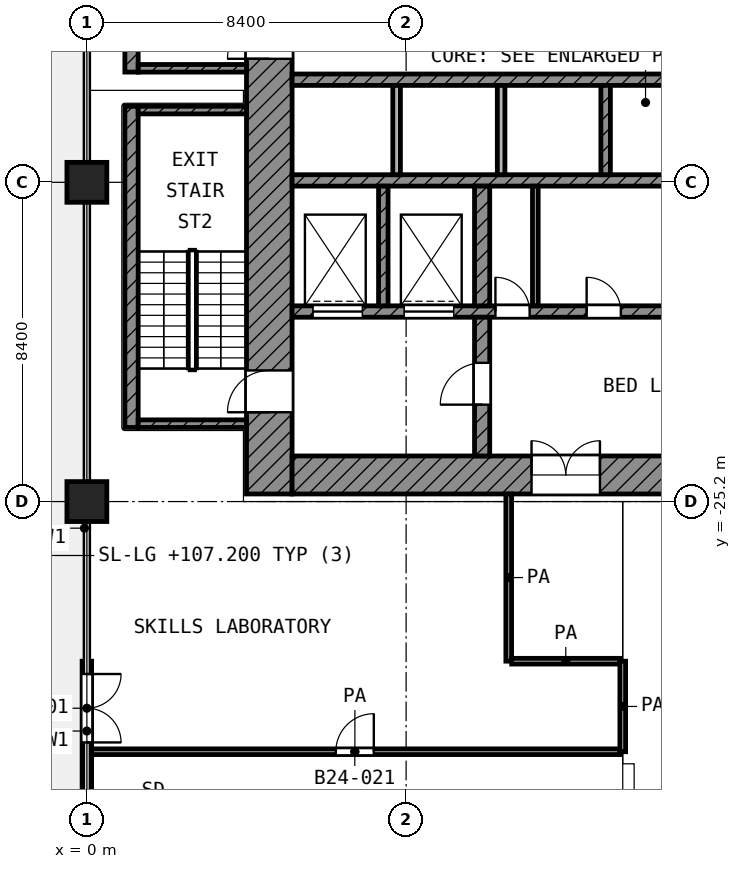
"""IFC4 building model, lengths in metres.
Left out: names, types, materials, properties, quantities, classifications, styles, units other than length and angle.
Written with IfcOpenShell. Run it as: python <this file> out.ifc"""

import sys

from ifc_helpers import new_model, si_unit, direction, frame, frame_2d, origin, origin_2d, place, context, subcontext, project, spatial, rectangle, extrude, element, fill, save


model = new_model("IFC4")
c1 = context("Model", 3, precision=1e-05, world=origin(), true_north=direction((0.0, 1.0)))
c2 = subcontext(c1, "Body", "Model", "MODEL_VIEW")
j1 = project(units=[si_unit("LENGTHUNIT", "METRE"), si_unit("PLANEANGLEUNIT", "RADIAN")], contexts=[c1])
p1 = place(None, origin())
s1 = spatial("IfcSite", under=j1, at=p1, CompositionType="ELEMENT")
p2 = place(p1, origin())
s2 = spatial("IfcBuilding", under=s1, at=p2, CompositionType="ELEMENT")
p3 = place(p2, frame((0.0, 0.0, 107.2)))
s3 = spatial("IfcBuildingStorey", under=s2, at=p3, CompositionType="ELEMENT", Elevation=107.2)
for number, where, z_axis, x_axis in (
    (1, (0.0, -16.8, 0.0), (0.0, 0.0, 1.0), (1.0, 0.0, 0.0)),
    (2, (0.0, -25.2, 0.0), (0.0, 0.0, 1.0), (1.0, 0.0, 0.0)),
):
    element("IfcColumn", number, at=place(p3, frame(where, z_axis=z_axis, x_axis=x_axis)), inside=s3, PredefinedType="COLUMN", context=c2, shape_type="SweptSolid", body=[
        extrude(rectangle(XDim=1.05, YDim=1.05, at=origin_2d()), origin(), (0.0, 0.0, 1.0), 4.2),
    ])
p4 = place(p3, frame((0.0, -29.4, 0.0), z_axis=(0.0, 0.0, 1.0), x_axis=(0.0, -1.0, 0.0)))
e3 = element("IfcWall", 3, at=p4, inside=s3, PredefinedType="SOLIDWALL", context=c2, shape_type="SweptSolid", body=[
    extrude(rectangle(XDim=3.675, YDim=0.25, at=frame_2d((1.837, 0.0))), origin(), (0.0, 0.0, 1.0), 3.48),
])
p5 = place(p4, frame((0.337, 0.0, 0.0)))
e4 = element("IfcOpeningElement", 4, at=p5, cuts=e3, PredefinedType="OPENING", context=c2, shape_type="SweptSolid", body=[
    extrude(rectangle(XDim=1.8, YDim=2.1, at=frame_2d((0.9, 1.05))), frame((0.0, 0.135, 0.0), z_axis=(0.0, -1.0, 0.0), x_axis=(1.0, 0.0, 0.0)), (0.0, 0.0, 1.0), 0.27),
])
p6 = place(p3, frame((4.8, -25.0, 0.0), z_axis=(0.0, 0.0, 1.0), x_axis=(0.0, 1.0, 0.0)))
e5 = element("IfcWall", 5, at=p6, inside=s3, PredefinedType="SHEAR", context=c2, shape_type="SweptSolid", body=[
    extrude(rectangle(XDim=19.6, YDim=1.2, at=frame_2d((9.8, 0.0))), origin(), (0.0, 0.0, 1.0), 3.6),
])
p7 = place(p6, frame((11.45, 0.0, 0.0)))
e6 = element("IfcOpeningElement", 6, at=p7, cuts=e5, PredefinedType="OPENING", context=c2, shape_type="SweptSolid", body=[
    extrude(rectangle(XDim=1.1, YDim=2.1, at=frame_2d((0.55, 1.05))), frame((0.0, 0.61, 0.0), z_axis=(0.0, -1.0, 0.0), x_axis=(1.0, 0.0, 0.0)), (0.0, 0.0, 1.0), 1.22),
])
p8 = place(p6, frame((2.15, 0.0, 0.0)))
e7 = element("IfcOpeningElement", 7, at=p8, cuts=e5, PredefinedType="OPENING", context=c2, shape_type="SweptSolid", body=[
    extrude(rectangle(XDim=1.1, YDim=2.1, at=frame_2d((0.55, 1.05))), frame((0.0, 0.61, 0.0), z_axis=(0.0, -1.0, 0.0), x_axis=(1.0, 0.0, 0.0)), (0.0, 0.0, 1.0), 1.22),
])
p9 = place(p3, frame((5.4, -24.5, 0.0), z_axis=(0.0, 0.0, 1.0), x_axis=(1.0, 0.0, 0.0)))
e8 = element("IfcWall", 8, at=p9, inside=s3, PredefinedType="SHEAR", context=c2, shape_type="SweptSolid", body=[
    extrude(rectangle(XDim=18.6, YDim=1.0, at=frame_2d((9.3, 0.0))), origin(), (0.0, 0.0, 1.0), 3.6),
])
p10 = place(p9, frame((6.3, 0.0, 0.0)))
e9 = element("IfcOpeningElement", 9, at=p10, cuts=e8, PredefinedType="OPENING", context=c2, shape_type="SweptSolid", body=[
    extrude(rectangle(XDim=1.8, YDim=2.1, at=frame_2d((0.9, 1.05))), frame((0.0, 0.51, 0.0), z_axis=(0.0, -1.0, 0.0), x_axis=(1.0, 0.0, 0.0)), (0.0, 0.0, 1.0), 1.02),
])
for number, where, z_axis, x_axis in (
    (10, (5.4, -14.1, 0.0), (0.0, 0.0, 1.0), (1.0, 0.0, 0.0)),
    (11, (5.4, -16.75, 0.0), (0.0, 0.0, 1.0), (1.0, 0.0, 0.0)),
):
    element("IfcWall", number, at=place(p3, frame(where, z_axis=z_axis, x_axis=x_axis)), inside=s3, PredefinedType="SHEAR", context=c2, shape_type="SweptSolid", body=[
        extrude(rectangle(XDim=16.65, YDim=0.3, at=frame_2d((8.325, 0.0))), origin(), (0.0, 0.0, 1.0), 3.6),
    ])
p11 = place(p3, frame((5.4, -20.2, 0.0), z_axis=(0.0, 0.0, 1.0), x_axis=(1.0, 0.0, 0.0)))
e12 = element("IfcWall", 12, at=p11, inside=s3, PredefinedType="SHEAR", context=c2, shape_type="SweptSolid", body=[
    extrude(rectangle(XDim=14.65, YDim=0.3, at=frame_2d((7.325, 0.0))), origin(), (0.0, 0.0, 1.0), 3.6),
])
p12 = place(p11, frame((10.55, 0.0, 0.0)))
e13 = element("IfcOpeningElement", 13, at=p12, cuts=e12, PredefinedType="OPENING", context=c2, shape_type="SweptSolid", body=[
    extrude(rectangle(XDim=1.3, YDim=2.1, at=frame_2d((0.65, 1.05))), frame((0.0, 0.16, 0.0), z_axis=(0.0, -1.0, 0.0), x_axis=(1.0, 0.0, 0.0)), (0.0, 0.0, 1.0), 0.32),
])
p13 = place(p11, frame((12.95, 0.0, 0.0)))
e14 = element("IfcOpeningElement", 14, at=p13, cuts=e12, PredefinedType="OPENING", context=c2, shape_type="SweptSolid", body=[
    extrude(rectangle(XDim=1.3, YDim=2.1, at=frame_2d((0.65, 1.05))), frame((0.0, 0.16, 0.0), z_axis=(0.0, -1.0, 0.0), x_axis=(1.0, 0.0, 0.0)), (0.0, 0.0, 1.0), 0.32),
])
p14 = place(p11, frame((0.55, 0.0, 0.0)))
e15 = element("IfcOpeningElement", 15, at=p14, cuts=e12, PredefinedType="OPENING", context=c2, shape_type="SweptSolid", body=[
    extrude(rectangle(XDim=1.3, YDim=2.1, at=frame_2d((0.65, 1.05))), frame((0.0, 0.16, 0.0), z_axis=(0.0, -1.0, 0.0), x_axis=(1.0, 0.0, 0.0)), (0.0, 0.0, 1.0), 0.32),
])
p15 = place(p11, frame((2.95, 0.0, 0.0)))
e16 = element("IfcOpeningElement", 16, at=p15, cuts=e12, PredefinedType="OPENING", context=c2, shape_type="SweptSolid", body=[
    extrude(rectangle(XDim=1.3, YDim=2.1, at=frame_2d((0.65, 1.05))), frame((0.0, 0.16, 0.0), z_axis=(0.0, -1.0, 0.0), x_axis=(1.0, 0.0, 0.0)), (0.0, 0.0, 1.0), 0.32),
])
p16 = place(p11, frame((5.35, 0.0, 0.0)))
e17 = element("IfcOpeningElement", 17, at=p16, cuts=e12, PredefinedType="OPENING", context=c2, shape_type="SweptSolid", body=[
    extrude(rectangle(XDim=0.9, YDim=2.1, at=frame_2d((0.45, 1.05))), frame((0.0, 0.16, 0.0), z_axis=(0.0, -1.0, 0.0), x_axis=(1.0, 0.0, 0.0)), (0.0, 0.0, 1.0), 0.32),
])
p17 = place(p11, frame((7.75, 0.0, 0.0)))
e18 = element("IfcOpeningElement", 18, at=p17, cuts=e12, PredefinedType="OPENING", context=c2, shape_type="SweptSolid", body=[
    extrude(rectangle(XDim=0.9, YDim=2.1, at=frame_2d((0.45, 1.05))), frame((0.0, 0.16, 0.0), z_axis=(0.0, -1.0, 0.0), x_axis=(1.0, 0.0, 0.0)), (0.0, 0.0, 1.0), 0.32),
])
p18 = place(p3, frame((10.4, -24.0, 0.0), z_axis=(0.0, 0.0, 1.0), x_axis=(0.0, 1.0, 0.0)))
e19 = element("IfcWall", 19, at=p18, inside=s3, PredefinedType="SHEAR", context=c2, shape_type="SweptSolid", body=[
    extrude(rectangle(XDim=3.65, YDim=0.4, at=frame_2d((1.825, 0.0))), origin(), (0.0, 0.0, 1.0), 3.6),
])
p19 = place(p18, frame((1.35, 0.0, 0.0)))
e20 = element("IfcOpeningElement", 20, at=p19, cuts=e19, PredefinedType="OPENING", context=c2, shape_type="SweptSolid", body=[
    extrude(rectangle(XDim=1.1, YDim=2.1, at=frame_2d((0.55, 1.05))), frame((0.0, 0.21, 0.0), z_axis=(0.0, -1.0, 0.0), x_axis=(1.0, 0.0, 0.0)), (0.0, 0.0, 1.0), 0.42),
])
p20 = place(p3, frame((10.4, -20.05, 0.0), z_axis=(0.0, 0.0, 1.0), x_axis=(0.0, 1.0, 0.0)))
e21 = element("IfcWall", 21, at=p20, inside=s3, PredefinedType="SHEAR", context=c2, shape_type="SweptSolid", body=[
    extrude(rectangle(XDim=3.15, YDim=0.4, at=frame_2d((1.575, 0.0))), origin(), (0.0, 0.0, 1.0), 3.6),
])
p21 = place(p3, frame((7.8, -20.05, 0.0), z_axis=(0.0, 0.0, 1.0), x_axis=(0.0, 1.0, 0.0)))
e22 = element("IfcWall", 22, at=p21, inside=s3, PredefinedType="SHEAR", context=c2, shape_type="SweptSolid", body=[
    extrude(rectangle(XDim=3.15, YDim=0.25, at=frame_2d((1.575, 0.0))), origin(), (0.0, 0.0, 1.0), 3.6),
])
for number, where, z_axis, x_axis in (
    (23, (8.15, -16.6, 0.0), (0.0, 0.0, 1.0), (0.0, 1.0, 0.0)),
    (24, (10.9, -16.6, 0.0), (0.0, 0.0, 1.0), (0.0, 1.0, 0.0)),
):
    element("IfcWall", number, at=place(p3, frame(where, z_axis=z_axis, x_axis=x_axis)), inside=s3, PredefinedType="PARTITIONING", context=c2, shape_type="SweptSolid", body=[
        extrude(rectangle(XDim=2.35, YDim=0.2, at=frame_2d((1.175, 0.0))), origin(), (0.0, 0.0, 1.0), 3.6),
    ])
p22 = place(p3, frame((13.65, -16.6, 0.0), z_axis=(0.0, 0.0, 1.0), x_axis=(0.0, 1.0, 0.0)))
e25 = element("IfcWall", 25, at=p22, inside=s3, PredefinedType="SHEAR", context=c2, shape_type="SweptSolid", body=[
    extrude(rectangle(XDim=2.35, YDim=0.25, at=frame_2d((1.175, 0.0))), origin(), (0.0, 0.0, 1.0), 3.6),
])
p23 = place(p3, frame((11.8, -20.05, 0.0), z_axis=(0.0, 0.0, 1.0), x_axis=(0.0, 1.0, 0.0)))
e26 = element("IfcWall", 26, at=p23, inside=s3, PredefinedType="PARTITIONING", context=c2, shape_type="SweptSolid", body=[
    extrude(rectangle(XDim=3.15, YDim=0.15, at=frame_2d((1.575, 0.0))), origin(), (0.0, 0.0, 1.0), 3.6),
])
p24 = place(p3, frame((1.175, -13.9, 0.0), z_axis=(0.0, 0.0, 1.0), x_axis=(0.0, 1.0, 0.0)))
e27 = element("IfcWall", 27, at=p24, inside=s3, PredefinedType="SHEAR", context=c2, shape_type="SweptSolid", body=[
    extrude(rectangle(XDim=8.45, YDim=0.35, at=frame_2d((4.225, 0.0))), origin(), (0.0, 0.0, 1.0), 3.6),
])
p25 = place(p3, frame((1.35, -13.8, 0.0), z_axis=(0.0, 0.0, 1.0), x_axis=(1.0, 0.0, 0.0)))
e28 = element("IfcWall", 28, at=p25, inside=s3, PredefinedType="SHEAR", context=c2, shape_type="SweptSolid", body=[
    extrude(rectangle(XDim=2.85, YDim=0.2, at=frame_2d((1.425, 0.0))), origin(), (0.0, 0.0, 1.0), 3.6),
])
p26 = place(p3, frame((1.175, -23.25, 0.0), z_axis=(0.0, 0.0, 1.0), x_axis=(0.0, 1.0, 0.0)))
e29 = element("IfcWall", 29, at=p26, inside=s3, PredefinedType="SHEAR", context=c2, shape_type="SweptSolid", body=[
    extrude(rectangle(XDim=8.45, YDim=0.35, at=frame_2d((4.225, 0.0))), origin(), (0.0, 0.0, 1.0), 3.6),
])
for number, where, z_axis, x_axis in (
    (30, (1.35, -14.9, 0.0), (0.0, 0.0, 1.0), (1.0, 0.0, 0.0)),
    (31, (1.35, -23.15, 0.0), (0.0, 0.0, 1.0), (1.0, 0.0, 0.0)),
):
    element("IfcWall", number, at=place(p3, frame(where, z_axis=z_axis, x_axis=x_axis)), inside=s3, PredefinedType="SHEAR", context=c2, shape_type="SweptSolid", body=[
        extrude(rectangle(XDim=2.85, YDim=0.2, at=frame_2d((1.425, 0.0))), origin(), (0.0, 0.0, 1.0), 3.6),
    ])
p27 = place(p3, frame((0.08, -31.782, 0.0), z_axis=(0.0, 0.0, 1.0), x_axis=(1.0, 0.0, 0.0)))
e32 = element("IfcWall", 32, at=p27, inside=s3, PredefinedType="PARTITIONING", context=c2, shape_type="SweptSolid", body=[
    extrude(rectangle(XDim=13.945, YDim=0.15, at=frame_2d((6.972, 0.0))), origin(), (0.0, 0.0, 1.0), 3.6),
])
p28 = place(p27, frame((6.47, 0.0, 0.0)))
e33 = element("IfcOpeningElement", 33, at=p28, cuts=e32, PredefinedType="OPENING", context=c2, shape_type="SweptSolid", body=[
    extrude(rectangle(XDim=1.0, YDim=2.1, at=frame_2d((0.5, 1.05))), frame((0.0, 0.085, 0.0), z_axis=(0.0, -1.0, 0.0), x_axis=(1.0, 0.0, 0.0)), (0.0, 0.0, 1.0), 0.17),
])
p29 = place(p3, frame((11.177, -29.4, 0.0), z_axis=(0.0, 0.0, 1.0), x_axis=(1.0, 0.0, 0.0)))
e34 = element("IfcWall", 34, at=p29, inside=s3, PredefinedType="PARTITIONING", context=c2, shape_type="SweptSolid", body=[
    extrude(rectangle(XDim=2.848, YDim=0.15, at=frame_2d((1.424, 0.0))), origin(), (0.0, 0.0, 1.0), 3.6),
])
p30 = place(p3, frame((11.1, -29.399, 0.0), z_axis=(0.0, 0.0, 1.0), x_axis=(0.0, 1.0, 0.0)))
e35 = element("IfcWall", 35, at=p30, inside=s3, PredefinedType="PARTITIONING", context=c2, shape_type="SweptSolid", body=[
    extrude(rectangle(XDim=4.399, YDim=0.15, at=frame_2d((2.199, 0.0))), origin(), (0.0, 0.0, 1.0), 3.6),
])
p31 = place(p3, frame((14.1, -31.782, 0.0), z_axis=(0.0, 0.0, 1.0), x_axis=(0.0, 1.0, 0.0)))
e36 = element("IfcWall", 36, at=p31, inside=s3, PredefinedType="PARTITIONING", context=c2, shape_type="SweptSolid", body=[
    extrude(rectangle(XDim=2.382, YDim=0.15, at=frame_2d((1.191, 0.0))), origin(), (0.0, 0.0, 1.0), 3.6),
])
p32 = place(p5, origin())
e37 = element("IfcDoor", 37, at=p32, inside=s3, OperationType="DOUBLE_DOOR_SINGLE_SWING", PredefinedType="DOOR", context=c2, shape_type="SweptSolid", body=[
    extrude(rectangle(XDim=1.8, YDim=2.1, at=frame_2d((0.9, 1.05))), frame((0.0, 0.025, 0.0), z_axis=(0.0, -1.0, 0.0), x_axis=(1.0, 0.0, 0.0)), (0.0, 0.0, 1.0), 0.05),
])
fill(e4, e37)
p33 = place(p14, origin())
e38 = element("IfcDoor", 38, at=p33, inside=s3, OperationType="DOUBLE_DOOR_SLIDING", PredefinedType="DOOR", context=c2, shape_type="SweptSolid", body=[
    extrude(rectangle(XDim=1.3, YDim=2.1, at=frame_2d((0.65, 1.05))), frame((0.0, 0.025, 0.0), z_axis=(0.0, -1.0, 0.0), x_axis=(1.0, 0.0, 0.0)), (0.0, 0.0, 1.0), 0.05),
])
fill(e15, e38)
p34 = place(p15, origin())
e39 = element("IfcDoor", 39, at=p34, inside=s3, OperationType="DOUBLE_DOOR_SLIDING", PredefinedType="DOOR", context=c2, shape_type="SweptSolid", body=[
    extrude(rectangle(XDim=1.3, YDim=2.1, at=frame_2d((0.65, 1.05))), frame((0.0, 0.025, 0.0), z_axis=(0.0, -1.0, 0.0), x_axis=(1.0, 0.0, 0.0)), (0.0, 0.0, 1.0), 0.05),
])
fill(e16, e39)
p35 = place(p7, origin())
e40 = element("IfcDoor", 40, at=p35, inside=s3, OperationType="SINGLE_SWING_LEFT", PredefinedType="DOOR", context=c2, shape_type="SweptSolid", body=[
    extrude(rectangle(XDim=1.1, YDim=2.1, at=frame_2d((0.55, 1.05))), frame((0.0, 0.025, 0.0), z_axis=(0.0, -1.0, 0.0), x_axis=(1.0, 0.0, 0.0)), (0.0, 0.0, 1.0), 0.05),
])
fill(e6, e40)
p36 = place(p8, origin())
e41 = element("IfcDoor", 41, at=p36, inside=s3, OperationType="SINGLE_SWING_LEFT", PredefinedType="DOOR", context=c2, shape_type="SweptSolid", body=[
    extrude(rectangle(XDim=1.1, YDim=2.1, at=frame_2d((0.55, 1.05))), frame((0.0, 0.025, 0.0), z_axis=(0.0, -1.0, 0.0), x_axis=(1.0, 0.0, 0.0)), (0.0, 0.0, 1.0), 0.05),
])
fill(e7, e41)
p37 = place(p19, origin())
e42 = element("IfcDoor", 42, at=p37, inside=s3, OperationType="SINGLE_SWING_LEFT", PredefinedType="DOOR", context=c2, shape_type="SweptSolid", body=[
    extrude(rectangle(XDim=1.1, YDim=2.1, at=frame_2d((0.55, 1.05))), frame((0.0, 0.025, 0.0), z_axis=(0.0, -1.0, 0.0), x_axis=(1.0, 0.0, 0.0)), (0.0, 0.0, 1.0), 0.05),
])
fill(e20, e42)
p38 = place(p10, origin())
e43 = element("IfcDoor", 43, at=p38, inside=s3, OperationType="DOUBLE_DOOR_SINGLE_SWING", PredefinedType="DOOR", context=c2, shape_type="SweptSolid", body=[
    extrude(rectangle(XDim=1.8, YDim=2.1, at=frame_2d((0.9, 1.05))), frame((0.0, 0.025, 0.0), z_axis=(0.0, -1.0, 0.0), x_axis=(1.0, 0.0, 0.0)), (0.0, 0.0, 1.0), 0.05),
])
fill(e9, e43)
p39 = place(p16, origin())
e44 = element("IfcDoor", 44, at=p39, inside=s3, OperationType="SINGLE_SWING_LEFT", PredefinedType="DOOR", context=c2, shape_type="SweptSolid", body=[
    extrude(rectangle(XDim=0.9, YDim=2.1, at=frame_2d((0.45, 1.05))), frame((0.0, 0.025, 0.0), z_axis=(0.0, -1.0, 0.0), x_axis=(1.0, 0.0, 0.0)), (0.0, 0.0, 1.0), 0.05),
])
fill(e17, e44)
p40 = place(p17, origin())
e45 = element("IfcDoor", 45, at=p40, inside=s3, OperationType="SINGLE_SWING_LEFT", PredefinedType="DOOR", context=c2, shape_type="SweptSolid", body=[
    extrude(rectangle(XDim=0.9, YDim=2.1, at=frame_2d((0.45, 1.05))), frame((0.0, 0.025, 0.0), z_axis=(0.0, -1.0, 0.0), x_axis=(1.0, 0.0, 0.0)), (0.0, 0.0, 1.0), 0.05),
])
fill(e18, e45)
p41 = place(p28, origin())
e46 = element("IfcDoor", 46, at=p41, inside=s3, OperationType="SINGLE_SWING_RIGHT", PredefinedType="DOOR", context=c2, shape_type="SweptSolid", body=[
    extrude(rectangle(XDim=1.0, YDim=2.1, at=frame_2d((0.5, 1.05))), frame((0.0, 0.025, 0.0), z_axis=(0.0, -1.0, 0.0), x_axis=(1.0, 0.0, 0.0)), (0.0, 0.0, 1.0), 0.05),
])
fill(e33, e46)
save(model, sys.argv[1])
